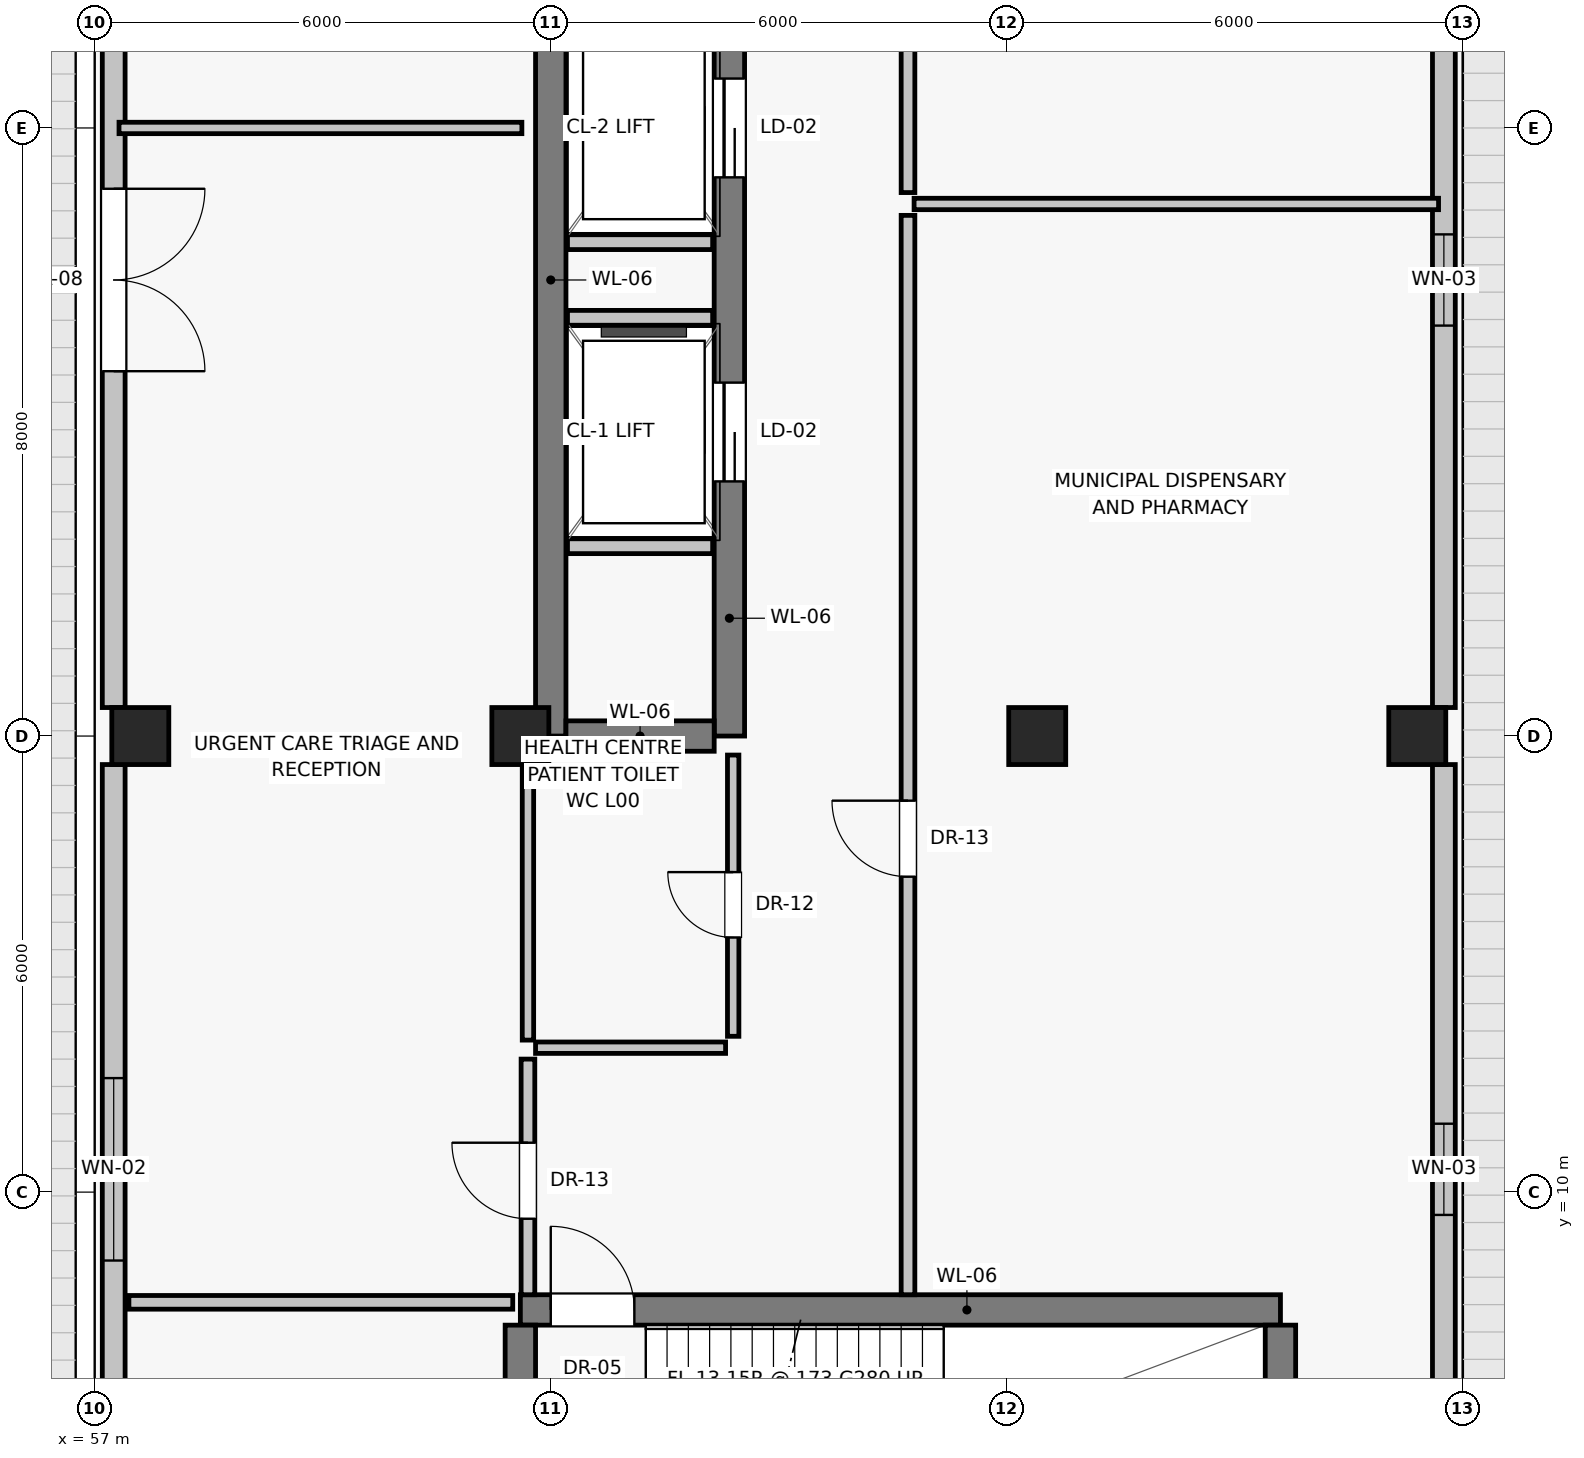
"""IFC4 building model, lengths in metres.
Left out: names, types, materials, properties, quantities, classifications, styles, units other than length and angle.
Written with IfcOpenShell. Run it as: python <this file> out.ifc"""

import sys

from ifc_helpers import new_model, si_unit, direction, frame, frame_2d, origin, origin_2d, place, context, subcontext, project, spatial, rectangle, extrude, source, transform, mapped, element, fill, save


model = new_model("IFC4")
c1 = context("Model", 3, precision=1e-05, world=origin(), true_north=direction((0.0, 1.0)))
c2 = subcontext(c1, "Body", "Model", "MODEL_VIEW")
j1 = project(units=[si_unit("LENGTHUNIT", "METRE"), si_unit("PLANEANGLEUNIT", "RADIAN")], contexts=[c1])
p1 = place(None, origin())
s1 = spatial("IfcSite", under=j1, at=p1, CompositionType="ELEMENT")
p2 = place(p1, origin())
s2 = spatial("IfcBuilding", under=s1, at=p2, CompositionType="ELEMENT")
p3 = place(p2, origin())
s3 = spatial("IfcBuildingStorey", under=s2, at=p3, CompositionType="ELEMENT", Elevation=0.0)
for number, where, z_axis, x_axis in (
    (1, (57.6, 16.0, 0.0), (0.0, 0.0, 1.0), (1.0, 0.0, 0.0)),
    (2, (62.6, 16.0, 0.0), (0.0, 0.0, 1.0), (1.0, 0.0, 0.0)),
    (3, (69.4, 16.0, 0.0), (0.0, 0.0, 1.0), (1.0, 0.0, 0.0)),
    (4, (74.4, 16.0, 0.0), (0.0, 0.0, 1.0), (1.0, 0.0, 0.0)),
):
    element("IfcColumn", number, at=place(p3, frame(where, z_axis=z_axis, x_axis=x_axis)), inside=s3, PredefinedType="COLUMN", context=c2, shape_type="SweptSolid", body=[
        extrude(rectangle(XDim=0.75, YDim=0.75, at=origin_2d()), origin(), (0.0, 0.0, 1.0), 5.2),
    ])
p4 = place(p3, frame((57.25, 27.625, 0.0), z_axis=(0.0, 0.0, 1.0), x_axis=(0.0, -1.0, 0.0)))
e5 = element("IfcWall", 5, at=p4, inside=s3, PredefinedType="SOLIDWALL", context=c2, shape_type="SweptSolid", body=[
    extrude(rectangle(XDim=11.25, YDim=0.3, at=frame_2d((5.625, 0.0))), origin(), (0.0, 0.0, 1.0), 4.15),
])
p5 = place(p4, frame((4.425, 0.0, 0.0)))
e6 = element("IfcOpeningElement", 6, at=p5, cuts=e5, PredefinedType="OPENING", context=c2, shape_type="SweptSolid", body=[
    extrude(rectangle(XDim=2.4, YDim=2.5, at=frame_2d((1.2, 1.25))), frame((0.0, 0.16, 0.0), z_axis=(0.0, -1.0, 0.0), x_axis=(1.0, 0.0, 0.0)), (0.0, 0.0, 1.0), 0.32),
])
p6 = place(p3, frame((57.25, 15.625, 0.0), z_axis=(0.0, 0.0, 1.0), x_axis=(0.0, -1.0, 0.0)))
e7 = element("IfcWall", 7, at=p6, inside=s3, PredefinedType="SOLIDWALL", context=c2, shape_type="SweptSolid", body=[
    extrude(rectangle(XDim=11.225, YDim=0.3, at=frame_2d((5.613, 0.0))), origin(), (0.0, 0.0, 1.0), 4.15),
])
p7 = place(p6, frame((4.125, 0.0, 0.85)))
e8 = element("IfcOpeningElement", 8, at=p7, cuts=e7, PredefinedType="OPENING", context=c2, shape_type="SweptSolid", body=[
    extrude(rectangle(XDim=2.4, YDim=1.8, at=frame_2d((1.2, 0.9))), frame((0.0, 0.16, 0.0), z_axis=(0.0, -1.0, 0.0), x_axis=(1.0, 0.0, 0.0)), (0.0, 0.0, 1.0), 0.32),
])
p8 = place(p3, frame((74.75, 4.4, 0.0), z_axis=(0.0, 0.0, 1.0), x_axis=(0.0, 1.0, 0.0)))
e9 = element("IfcWall", 9, at=p8, inside=s3, PredefinedType="SOLIDWALL", context=c2, shape_type="SweptSolid", body=[
    extrude(rectangle(XDim=11.225, YDim=0.3, at=frame_2d((5.613, 0.0))), origin(), (0.0, 0.0, 1.0), 4.15),
])
p9 = place(p8, frame((5.3, 0.0, 0.95)))
e10 = element("IfcOpeningElement", 10, at=p9, cuts=e9, PredefinedType="OPENING", context=c2, shape_type="SweptSolid", body=[
    extrude(rectangle(XDim=1.2, YDim=1.5, at=frame_2d((0.6, 0.75))), frame((0.0, 0.16, 0.0), z_axis=(0.0, -1.0, 0.0), x_axis=(1.0, 0.0, 0.0)), (0.0, 0.0, 1.0), 0.32),
])
p10 = place(p3, frame((74.75, 16.375, 0.0), z_axis=(0.0, 0.0, 1.0), x_axis=(0.0, 1.0, 0.0)))
e11 = element("IfcWall", 11, at=p10, inside=s3, PredefinedType="SOLIDWALL", context=c2, shape_type="SweptSolid", body=[
    extrude(rectangle(XDim=11.25, YDim=0.3, at=frame_2d((5.625, 0.0))), origin(), (0.0, 0.0, 1.0), 4.15),
])
p11 = place(p10, frame((5.025, 0.0, 0.95)))
e12 = element("IfcOpeningElement", 12, at=p11, cuts=e11, PredefinedType="OPENING", context=c2, shape_type="SweptSolid", body=[
    extrude(rectangle(XDim=1.2, YDim=1.5, at=frame_2d((0.6, 0.75))), frame((0.0, 0.16, 0.0), z_axis=(0.0, -1.0, 0.0), x_axis=(1.0, 0.0, 0.0)), (0.0, 0.0, 1.0), 0.32),
])
p12 = place(p3, frame((63.0, 16.0, 0.0), z_axis=(0.0, 0.0, 1.0), x_axis=(0.0, 1.0, 0.0)))
e13 = element("IfcWall", 13, at=p12, inside=s3, PredefinedType="SHEAR", context=c2, shape_type="SweptSolid", body=[
    extrude(rectangle(XDim=12.0, YDim=0.4, at=frame_2d((6.0, 0.0))), origin(), (0.0, 0.0, 1.0), 4.9),
])
p13 = place(p3, frame((65.35, 16.0, 0.0), z_axis=(0.0, 0.0, 1.0), x_axis=(0.0, 1.0, 0.0)))
e14 = element("IfcWall", 14, at=p13, inside=s3, PredefinedType="SHEAR", context=c2, shape_type="SweptSolid", body=[
    extrude(rectangle(XDim=12.0, YDim=0.4, at=frame_2d((6.0, 0.0))), origin(), (0.0, 0.0, 1.0), 4.9),
])
p14 = place(p13, frame((3.35, 0.0, 0.0)))
e15 = element("IfcOpeningElement", 15, at=p14, cuts=e14, PredefinedType="OPENING", context=c2, shape_type="SweptSolid", body=[
    extrude(rectangle(XDim=1.3, YDim=2.25, at=frame_2d((0.65, 1.125))), frame((0.0, 0.21, 0.0), z_axis=(0.0, -1.0, 0.0), x_axis=(1.0, 0.0, 0.0)), (0.0, 0.0, 1.0), 0.42),
])
p15 = place(p13, frame((7.35, 0.0, 0.0)))
e16 = element("IfcOpeningElement", 16, at=p15, cuts=e14, PredefinedType="OPENING", context=c2, shape_type="SweptSolid", body=[
    extrude(rectangle(XDim=1.3, YDim=2.25, at=frame_2d((0.65, 1.125))), frame((0.0, 0.21, 0.0), z_axis=(0.0, -1.0, 0.0), x_axis=(1.0, 0.0, 0.0)), (0.0, 0.0, 1.0), 0.42),
])
p16 = place(p3, frame((63.2, 16.0, 0.0), z_axis=(0.0, 0.0, 1.0), x_axis=(1.0, 0.0, 0.0)))
e17 = element("IfcWall", 17, at=p16, inside=s3, PredefinedType="SHEAR", context=c2, shape_type="SweptSolid", body=[
    extrude(rectangle(XDim=1.95, YDim=0.4, at=frame_2d((0.975, 0.0))), origin(), (0.0, 0.0, 1.0), 4.9),
])
for number, where, z_axis, x_axis in (
    (18, (63.22, 18.5, 0.0), (0.0, 0.0, 1.0), (1.0, 0.0, 0.0)),
    (19, (63.22, 21.5, 0.0), (0.0, 0.0, 1.0), (1.0, 0.0, 0.0)),
    (20, (63.22, 22.5, 0.0), (0.0, 0.0, 1.0), (1.0, 0.0, 0.0)),
):
    element("IfcWall", number, at=place(p3, frame(where, z_axis=z_axis, x_axis=x_axis)), inside=s3, PredefinedType="SOLIDWALL", context=c2, shape_type="SweptSolid", body=[
        extrude(rectangle(XDim=1.91, YDim=0.2, at=frame_2d((0.955, 0.0))), origin(), (0.0, 0.0, 1.0), 4.9),
    ])
p17 = place(p3, frame((62.6, 8.45, 0.0), z_axis=(0.0, 0.0, 1.0), x_axis=(1.0, 0.0, 0.0)))
e21 = element("IfcWall", 21, at=p17, inside=s3, PredefinedType="SHEAR", context=c2, shape_type="SweptSolid", body=[
    extrude(rectangle(XDim=10.0, YDim=0.4, at=frame_2d((5.0, 0.0))), origin(), (0.0, 0.0, 1.0), 4.9),
])
p18 = place(p17, frame((0.4, 0.0, 0.0)))
e22 = element("IfcOpeningElement", 22, at=p18, cuts=e21, PredefinedType="OPENING", context=c2, shape_type="SweptSolid", body=[
    extrude(rectangle(XDim=1.1, YDim=2.03, at=frame_2d((0.55, 1.015))), frame((0.0, 0.21, 0.0), z_axis=(0.0, -1.0, 0.0), x_axis=(1.0, 0.0, 0.0)), (0.0, 0.0, 1.0), 0.42),
])
for number, where, z_axis, x_axis in (
    (23, (62.6, 5.2, 0.0), (0.0, 0.0, 1.0), (0.0, 1.0, 0.0)),
    (24, (72.6, 5.2, 0.0), (0.0, 0.0, 1.0), (0.0, 1.0, 0.0)),
):
    element("IfcWall", number, at=place(p3, frame(where, z_axis=z_axis, x_axis=x_axis)), inside=s3, PredefinedType="SHEAR", context=c2, shape_type="SweptSolid", body=[
        extrude(rectangle(XDim=3.05, YDim=0.4, at=frame_2d((1.525, 0.0))), origin(), (0.0, 0.0, 1.0), 4.9),
    ])
p19 = place(p3, frame((57.45, 8.55, 0.0), z_axis=(0.0, 0.0, 1.0), x_axis=(1.0, 0.0, 0.0)))
e25 = element("IfcWall", 25, at=p19, inside=s3, PredefinedType="PARTITIONING", context=c2, shape_type="SweptSolid", body=[
    extrude(rectangle(XDim=5.05, YDim=0.18, at=frame_2d((2.525, 0.0))), origin(), (0.0, 0.0, 1.0), 4.9),
])
p20 = place(p3, frame((62.8, 11.9, 0.0), z_axis=(0.0, 0.0, 1.0), x_axis=(1.0, 0.0, 0.0)))
e26 = element("IfcWall", 26, at=p20, inside=s3, PredefinedType="PARTITIONING", context=c2, shape_type="SweptSolid", body=[
    extrude(rectangle(XDim=2.5, YDim=0.15, at=frame_2d((1.25, 0.0))), origin(), (0.0, 0.0, 1.0), 4.9),
])
p21 = place(p3, frame((62.7, 12.0, 0.0), z_axis=(0.0, 0.0, 1.0), x_axis=(0.0, 1.0, 0.0)))
e27 = element("IfcWall", 27, at=p21, inside=s3, PredefinedType="PARTITIONING", context=c2, shape_type="SweptSolid", body=[
    extrude(rectangle(XDim=3.8, YDim=0.15, at=frame_2d((1.9, 0.0))), origin(), (0.0, 0.0, 1.0), 4.3),
])
p22 = place(p3, frame((65.4, 12.05, 0.0), z_axis=(0.0, 0.0, 1.0), x_axis=(0.0, 1.0, 0.0)))
e28 = element("IfcWall", 28, at=p22, inside=s3, PredefinedType="PARTITIONING", context=c2, shape_type="SweptSolid", body=[
    extrude(rectangle(XDim=3.7, YDim=0.15, at=frame_2d((1.85, 0.0))), origin(), (0.0, 0.0, 1.0), 4.9),
])
p23 = place(p22, frame((1.3, 0.0, 0.0)))
e29 = element("IfcOpeningElement", 29, at=p23, cuts=e28, PredefinedType="OPENING", context=c2, shape_type="SweptSolid", body=[
    extrude(rectangle(XDim=0.86, YDim=2.01, at=frame_2d((0.43, 1.005))), frame((0.0, 0.085, 0.0), z_axis=(0.0, -1.0, 0.0), x_axis=(1.0, 0.0, 0.0)), (0.0, 0.0, 1.0), 0.17),
])
p24 = place(p3, frame((62.7, 8.65, 0.0), z_axis=(0.0, 0.0, 1.0), x_axis=(0.0, 1.0, 0.0)))
e30 = element("IfcWall", 30, at=p24, inside=s3, PredefinedType="PARTITIONING", context=c2, shape_type="SweptSolid", body=[
    extrude(rectangle(XDim=3.1, YDim=0.18, at=frame_2d((1.55, 0.0))), origin(), (0.0, 0.0, 1.0), 4.3),
])
p25 = place(p24, frame((1.0, 0.0, 0.0)))
e31 = element("IfcOpeningElement", 31, at=p25, cuts=e30, PredefinedType="OPENING", context=c2, shape_type="SweptSolid", body=[
    extrude(rectangle(XDim=1.0, YDim=2.01, at=frame_2d((0.5, 1.005))), frame((0.0, 0.1, 0.0), z_axis=(0.0, -1.0, 0.0), x_axis=(1.0, 0.0, 0.0)), (0.0, 0.0, 1.0), 0.2),
])
p26 = place(p3, frame((57.32, 24.0, 0.0), z_axis=(0.0, 0.0, 1.0), x_axis=(1.0, 0.0, 0.0)))
e32 = element("IfcWall", 32, at=p26, inside=s3, PredefinedType="PARTITIONING", context=c2, shape_type="SweptSolid", body=[
    extrude(rectangle(XDim=5.3, YDim=0.15, at=frame_2d((2.65, 0.0))), origin(), (0.0, 0.0, 1.0), 4.9),
])
p27 = place(p3, frame((67.7, 8.65, 0.0), z_axis=(0.0, 0.0, 1.0), x_axis=(0.0, 1.0, 0.0)))
e33 = element("IfcWall", 33, at=p27, inside=s3, PredefinedType="PARTITIONING", context=c2, shape_type="SweptSolid", body=[
    extrude(rectangle(XDim=14.2, YDim=0.18, at=frame_2d((7.1, 0.0))), origin(), (0.0, 0.0, 1.0), 4.9),
])
p28 = place(p27, frame((5.5, 0.0, 0.0)))
e34 = element("IfcOpeningElement", 34, at=p28, cuts=e33, PredefinedType="OPENING", context=c2, shape_type="SweptSolid", body=[
    extrude(rectangle(XDim=1.0, YDim=2.01, at=frame_2d((0.5, 1.005))), frame((0.0, 0.1, 0.0), z_axis=(0.0, -1.0, 0.0), x_axis=(1.0, 0.0, 0.0)), (0.0, 0.0, 1.0), 0.2),
])
p29 = place(p3, frame((67.7, 23.15, 0.0), z_axis=(0.0, 0.0, 1.0), x_axis=(0.0, 1.0, 0.0)))
e35 = element("IfcWall", 35, at=p29, inside=s3, PredefinedType="PARTITIONING", context=c2, shape_type="SweptSolid", body=[
    extrude(rectangle(XDim=16.2, YDim=0.18, at=frame_2d((8.1, 0.0))), origin(), (0.0, 0.0, 1.0), 4.9),
])
p30 = place(p29, frame((5.5, 0.0, 0.0)))
e36 = element("IfcOpeningElement", 36, at=p30, cuts=e35, PredefinedType="OPENING", context=c2, shape_type="SweptSolid", body=[
    extrude(rectangle(XDim=1.0, YDim=2.01, at=frame_2d((0.5, 1.005))), frame((0.0, 0.1, 0.0), z_axis=(0.0, -1.0, 0.0), x_axis=(1.0, 0.0, 0.0)), (0.0, 0.0, 1.0), 0.2),
])
p31 = place(p3, frame((67.78, 23.0, 0.0), z_axis=(0.0, 0.0, 1.0), x_axis=(1.0, 0.0, 0.0)))
e37 = element("IfcWall", 37, at=p31, inside=s3, PredefinedType="PARTITIONING", context=c2, shape_type="SweptSolid", body=[
    extrude(rectangle(XDim=6.9, YDim=0.15, at=frame_2d((3.45, 0.0))), origin(), (0.0, 0.0, 1.0), 4.9),
])
m1 = source(origin(), c2, "Body", "SweptSolid", [
    extrude(rectangle(XDim=2.4, YDim=2.5, at=frame_2d((1.2, 1.25))), frame((0.0, 0.025, 0.0), z_axis=(0.0, -1.0, 0.0), x_axis=(1.0, 0.0, 0.0)), (0.0, 0.0, 1.0), 0.05),
])
p32 = place(p5, frame((2.4, 0.0, 0.0), z_axis=(0.0, 0.0, 1.0), x_axis=(-1.0, 0.0, 0.0)))
e38 = element("IfcDoor", 38, at=p32, inside=s3, OperationType="DOUBLE_SWING_LEFT", PredefinedType="DOOR", context=c2, shape_type="MappedRepresentation", body=[
    mapped(m1, transform((0.0, 0.0, 0.0), scale=1.0)),
])
fill(e6, e38)
m2 = source(origin(), c2, "Body", "SweptSolid", [
    extrude(rectangle(XDim=2.4, YDim=1.8, at=frame_2d((1.2, 0.9))), frame((0.0, 0.03, 0.0), z_axis=(0.0, -1.0, 0.0), x_axis=(1.0, 0.0, 0.0)), (0.0, 0.0, 1.0), 0.06),
])
p33 = place(p7, origin())
e39 = element("IfcWindow", 39, at=p33, inside=s3, PartitioningType="SINGLE_PANEL", PredefinedType="WINDOW", context=c2, shape_type="MappedRepresentation", body=[
    mapped(m2, transform((0.0, 0.0, 0.0), scale=1.0)),
])
fill(e8, e39)
m3 = source(origin(), c2, "Body", "SweptSolid", [
    extrude(rectangle(XDim=1.2, YDim=1.5, at=frame_2d((0.6, 0.75))), frame((0.0, 0.03, 0.0), z_axis=(0.0, -1.0, 0.0), x_axis=(1.0, 0.0, 0.0)), (0.0, 0.0, 1.0), 0.06),
])
p34 = place(p9, origin())
e40 = element("IfcWindow", 40, at=p34, inside=s3, PartitioningType="SINGLE_PANEL", PredefinedType="WINDOW", context=c2, shape_type="MappedRepresentation", body=[
    mapped(m3, transform((0.0, 0.0, 0.0), scale=1.0)),
])
fill(e10, e40)
p35 = place(p11, origin())
e41 = element("IfcWindow", 41, at=p35, inside=s3, PartitioningType="SINGLE_PANEL", PredefinedType="WINDOW", context=c2, shape_type="MappedRepresentation", body=[
    mapped(m3, transform((0.0, 0.0, 0.0), scale=1.0)),
])
fill(e12, e41)
m4 = source(origin(), c2, "Body", "SweptSolid", [
    extrude(rectangle(XDim=1.3, YDim=2.25, at=frame_2d((0.65, 1.125))), frame((0.0, 0.025, 0.0), z_axis=(0.0, -1.0, 0.0), x_axis=(1.0, 0.0, 0.0)), (0.0, 0.0, 1.0), 0.05),
])
p36 = place(p14, origin())
e42 = element("IfcDoor", 42, at=p36, inside=s3, OperationType="SLIDING_TO_LEFT", PredefinedType="DOOR", context=c2, shape_type="MappedRepresentation", body=[
    mapped(m4, transform((0.0, 0.0, 0.0), scale=1.0)),
])
fill(e15, e42)
p37 = place(p15, origin())
e43 = element("IfcDoor", 43, at=p37, inside=s3, OperationType="SLIDING_TO_LEFT", PredefinedType="DOOR", context=c2, shape_type="MappedRepresentation", body=[
    mapped(m4, transform((0.0, 0.0, 0.0), scale=1.0)),
])
fill(e16, e43)
m5 = source(origin(), c2, "Body", "SweptSolid", [
    extrude(rectangle(XDim=1.1, YDim=2.03, at=frame_2d((0.55, 1.015))), frame((0.0, 0.025, 0.0), z_axis=(0.0, -1.0, 0.0), x_axis=(1.0, 0.0, 0.0)), (0.0, 0.0, 1.0), 0.05),
])
p38 = place(p18, origin())
e44 = element("IfcDoor", 44, at=p38, inside=s3, OperationType="SINGLE_SWING_LEFT", PredefinedType="DOOR", context=c2, shape_type="MappedRepresentation", body=[
    mapped(m5, transform((0.0, 0.0, 0.0), scale=1.0)),
])
fill(e22, e44)
m6 = source(origin(), c2, "Body", "SweptSolid", [
    extrude(rectangle(XDim=0.86, YDim=2.01, at=frame_2d((0.43, 1.005))), frame((0.0, 0.025, 0.0), z_axis=(0.0, -1.0, 0.0), x_axis=(1.0, 0.0, 0.0)), (0.0, 0.0, 1.0), 0.05),
])
p39 = place(p23, origin())
e45 = element("IfcDoor", 45, at=p39, inside=s3, OperationType="SINGLE_SWING_RIGHT", PredefinedType="DOOR", context=c2, shape_type="MappedRepresentation", body=[
    mapped(m6, transform((0.0, 0.0, 0.0), scale=1.0)),
])
fill(e29, e45)
m7 = source(origin(), c2, "Body", "SweptSolid", [
    extrude(rectangle(XDim=1.0, YDim=2.01, at=frame_2d((0.5, 1.005))), frame((0.0, 0.025, 0.0), z_axis=(0.0, -1.0, 0.0), x_axis=(1.0, 0.0, 0.0)), (0.0, 0.0, 1.0), 0.05),
])
p40 = place(p25, origin())
e46 = element("IfcDoor", 46, at=p40, inside=s3, OperationType="SINGLE_SWING_RIGHT", PredefinedType="DOOR", context=c2, shape_type="MappedRepresentation", body=[
    mapped(m7, transform((0.0, 0.0, 0.0), scale=1.0)),
])
fill(e31, e46)
p41 = place(p28, origin())
e47 = element("IfcDoor", 47, at=p41, inside=s3, OperationType="SINGLE_SWING_RIGHT", PredefinedType="DOOR", context=c2, shape_type="MappedRepresentation", body=[
    mapped(m7, transform((0.0, 0.0, 0.0), scale=1.0)),
])
fill(e34, e47)
save(model, sys.argv[1])
